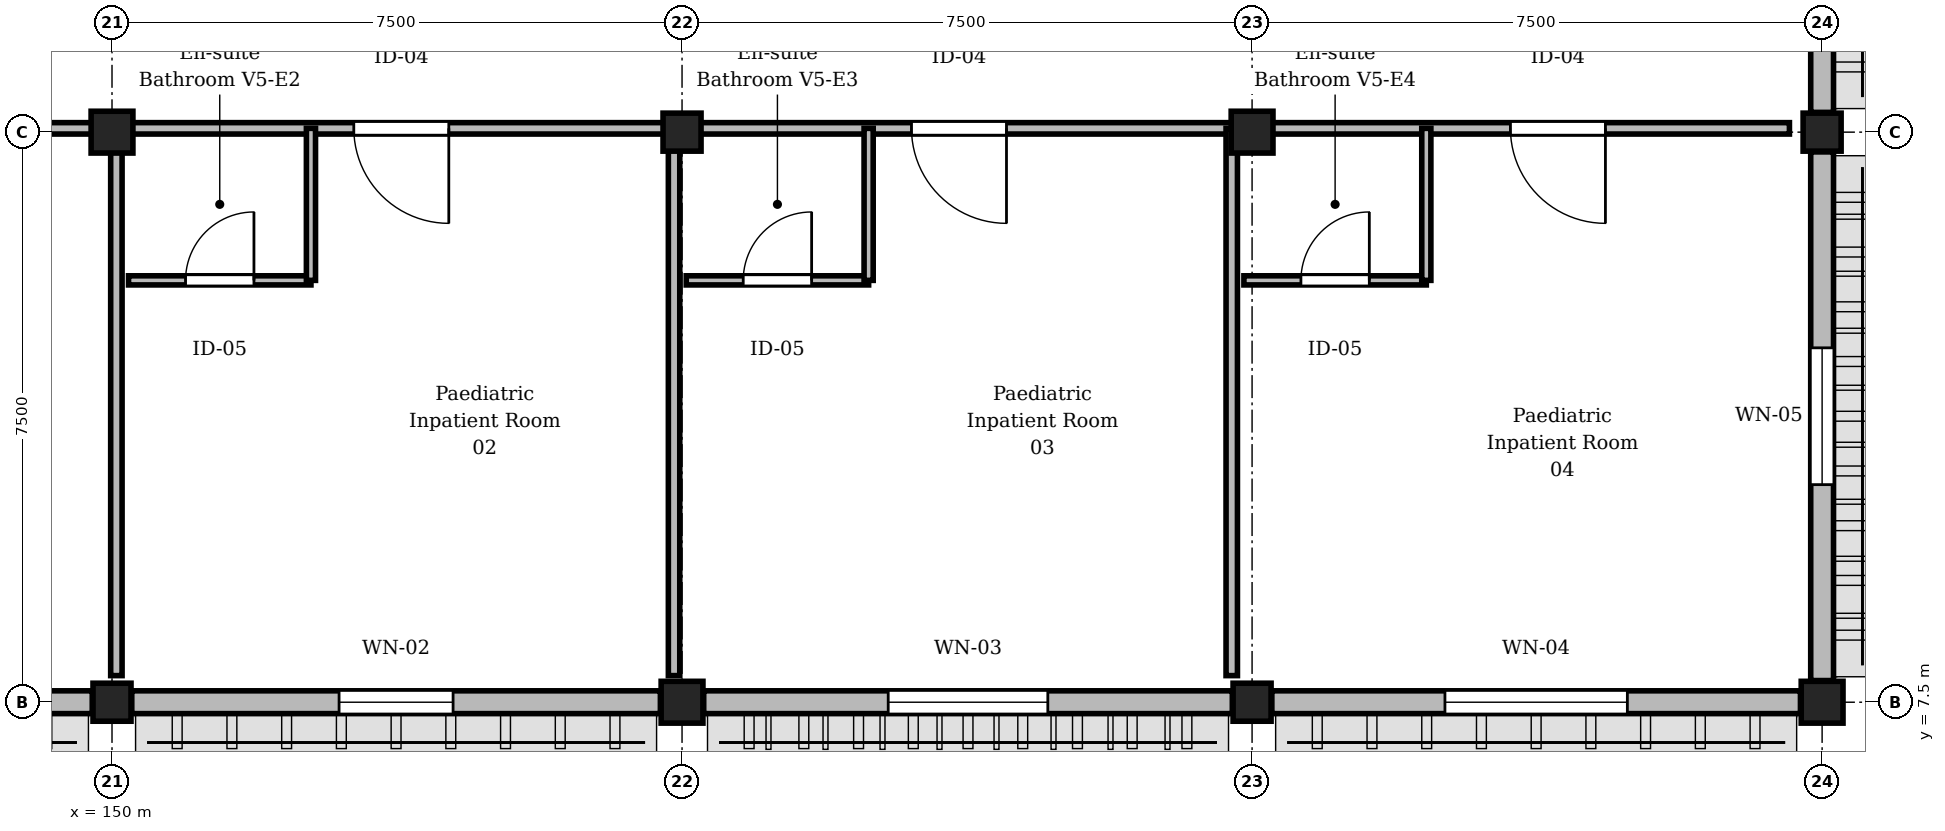
"""IFC4 building model, lengths in metres.
Left out: names, types, materials, properties, quantities, classifications, styles, units other than length and angle.
Written with IfcOpenShell. Run it as: python <this file> out.ifc"""

import sys

from ifc_helpers import new_model, si_unit, direction, frame, frame_2d, origin, origin_2d, place, context, subcontext, project, spatial, rectangle, extrude, element, fill, save


model = new_model("IFC4")
c1 = context("Model", 3, precision=1e-05, world=origin(), true_north=direction((0.0, 1.0)))
c2 = subcontext(c1, "Body", "Model", "MODEL_VIEW")
j1 = project(units=[si_unit("LENGTHUNIT", "METRE"), si_unit("PLANEANGLEUNIT", "RADIAN")], contexts=[c1])
p1 = place(None, origin())
s1 = spatial("IfcSite", under=j1, at=p1, CompositionType="ELEMENT")
p2 = place(p1, origin())
s2 = spatial("IfcBuilding", under=s1, at=p2, CompositionType="ELEMENT")
p3 = place(p2, frame((0.0, 0.0, 17.85)))
s3 = spatial("IfcBuildingStorey", under=s2, at=p3, CompositionType="ELEMENT", Elevation=17.85)
p4 = place(p3, frame((150.0, 7.5, 0.0), z_axis=(0.0, 0.0, 1.0), x_axis=(1.0, 0.0, 0.0)))
e1 = element("IfcColumn", 1, at=p4, inside=s3, PredefinedType="COLUMN", context=c2, shape_type="SweptSolid", body=[
    extrude(rectangle(XDim=0.5, YDim=0.5, at=origin_2d()), origin(), (0.0, 0.0, 1.0), 4.05),
])
for number, where, z_axis, x_axis in (
    (2, (150.0, 15.0, 0.0), (0.0, 0.0, 1.0), (1.0, 0.0, 0.0)),
    (3, (157.5, 7.5, 0.0), (0.0, 0.0, 1.0), (1.0, 0.0, 0.0)),
):
    element("IfcColumn", number, at=place(p3, frame(where, z_axis=z_axis, x_axis=x_axis)), inside=s3, PredefinedType="COLUMN", context=c2, shape_type="SweptSolid", body=[
        extrude(rectangle(XDim=0.55, YDim=0.55, at=origin_2d()), origin(), (0.0, 0.0, 1.0), 4.05),
    ])
for number, where, z_axis, x_axis in (
    (4, (157.5, 15.0, 0.0), (0.0, 0.0, 1.0), (1.0, 0.0, 0.0)),
    (5, (165.0, 7.5, 0.0), (0.0, 0.0, 1.0), (1.0, 0.0, 0.0)),
):
    element("IfcColumn", number, at=place(p3, frame(where, z_axis=z_axis, x_axis=x_axis)), inside=s3, PredefinedType="COLUMN", context=c2, shape_type="SweptSolid", body=[
        extrude(rectangle(XDim=0.5, YDim=0.5, at=origin_2d()), origin(), (0.0, 0.0, 1.0), 4.05),
    ])
for number, where, z_axis, x_axis in (
    (6, (165.0, 15.0, 0.0), (0.0, 0.0, 1.0), (1.0, 0.0, 0.0)),
    (7, (172.5, 7.5, 0.0), (0.0, 0.0, 1.0), (1.0, 0.0, 0.0)),
):
    element("IfcColumn", number, at=place(p3, frame(where, z_axis=z_axis, x_axis=x_axis)), inside=s3, PredefinedType="COLUMN", context=c2, shape_type="SweptSolid", body=[
        extrude(rectangle(XDim=0.55, YDim=0.55, at=origin_2d()), origin(), (0.0, 0.0, 1.0), 4.05),
    ])
p5 = place(p3, frame((172.5, 15.0, 0.0), z_axis=(0.0, 0.0, 1.0), x_axis=(1.0, 0.0, 0.0)))
e8 = element("IfcColumn", 8, at=p5, inside=s3, PredefinedType="COLUMN", context=c2, shape_type="SweptSolid", body=[
    extrude(rectangle(XDim=0.5, YDim=0.5, at=origin_2d()), origin(), (0.0, 0.0, 1.0), 4.05),
])
p6 = place(p3, frame((149.74, 7.5, 0.0), z_axis=(0.0, 0.0, 1.0), x_axis=(-1.0, 0.0, 0.0)))
e9 = element("IfcWall", 9, at=p6, inside=s3, PredefinedType="STANDARD", context=c2, shape_type="SweptSolid", body=[
    extrude(rectangle(XDim=6.955, YDim=0.3, at=frame_2d((3.478, 0.0))), origin(), (0.0, 0.0, 1.0), 3.17),
])
p7 = place(p6, frame((2.577, 0.0, 0.9)))
e10 = element("IfcOpeningElement", 10, at=p7, cuts=e9, PredefinedType="OPENING", context=c2, shape_type="SweptSolid", body=[
    extrude(rectangle(XDim=1.8, YDim=1.99, at=frame_2d((0.9, 0.995))), frame((0.0, 0.16, 0.0), z_axis=(0.0, -1.0, 0.0), x_axis=(1.0, 0.0, 0.0)), (0.0, 0.0, 1.0), 0.32),
])
p8 = place(p3, frame((157.215, 7.5, 0.0), z_axis=(0.0, 0.0, 1.0), x_axis=(-1.0, 0.0, 0.0)))
e11 = element("IfcWall", 11, at=p8, inside=s3, PredefinedType="STANDARD", context=c2, shape_type="SweptSolid", body=[
    extrude(rectangle(XDim=6.955, YDim=0.3, at=frame_2d((3.478, 0.0))), origin(), (0.0, 0.0, 1.0), 3.17),
])
p9 = place(p8, frame((2.728, 0.0, 0.9)))
e12 = element("IfcOpeningElement", 12, at=p9, cuts=e11, PredefinedType="OPENING", context=c2, shape_type="SweptSolid", body=[
    extrude(rectangle(XDim=1.5, YDim=1.99, at=frame_2d((0.75, 0.995))), frame((0.0, 0.16, 0.0), z_axis=(0.0, -1.0, 0.0), x_axis=(1.0, 0.0, 0.0)), (0.0, 0.0, 1.0), 0.32),
])
p10 = place(p3, frame((164.74, 7.5, 0.0), z_axis=(0.0, 0.0, 1.0), x_axis=(-1.0, 0.0, 0.0)))
e13 = element("IfcWall", 13, at=p10, inside=s3, PredefinedType="STANDARD", context=c2, shape_type="SweptSolid", body=[
    extrude(rectangle(XDim=6.955, YDim=0.3, at=frame_2d((3.478, 0.0))), origin(), (0.0, 0.0, 1.0), 3.17),
])
p11 = place(p10, frame((2.427, 0.0, 0.9)))
e14 = element("IfcOpeningElement", 14, at=p11, cuts=e13, PredefinedType="OPENING", context=c2, shape_type="SweptSolid", body=[
    extrude(rectangle(XDim=2.1, YDim=1.99, at=frame_2d((1.05, 0.995))), frame((0.0, 0.16, 0.0), z_axis=(0.0, -1.0, 0.0), x_axis=(1.0, 0.0, 0.0)), (0.0, 0.0, 1.0), 0.32),
])
p12 = place(p3, frame((172.215, 7.5, 0.0), z_axis=(0.0, 0.0, 1.0), x_axis=(-1.0, 0.0, 0.0)))
e15 = element("IfcWall", 15, at=p12, inside=s3, PredefinedType="STANDARD", context=c2, shape_type="SweptSolid", body=[
    extrude(rectangle(XDim=6.955, YDim=0.3, at=frame_2d((3.478, 0.0))), origin(), (0.0, 0.0, 1.0), 3.17),
])
p13 = place(p12, frame((2.278, 0.0, 0.9)))
e16 = element("IfcOpeningElement", 16, at=p13, cuts=e15, PredefinedType="OPENING", context=c2, shape_type="SweptSolid", body=[
    extrude(rectangle(XDim=2.4, YDim=1.99, at=frame_2d((1.2, 0.995))), frame((0.0, 0.16, 0.0), z_axis=(0.0, -1.0, 0.0), x_axis=(1.0, 0.0, 0.0)), (0.0, 0.0, 1.0), 0.32),
])
p14 = place(p3, frame((172.5, 14.74, 0.0), z_axis=(0.0, 0.0, 1.0), x_axis=(0.0, -1.0, 0.0)))
e17 = element("IfcWall", 17, at=p14, inside=s3, PredefinedType="STANDARD", context=c2, shape_type="SweptSolid", body=[
    extrude(rectangle(XDim=6.955, YDim=0.3, at=frame_2d((3.478, 0.0))), origin(), (0.0, 0.0, 1.0), 3.17),
])
p15 = place(p14, frame((2.577, 0.0, 0.9)))
e18 = element("IfcOpeningElement", 18, at=p15, cuts=e17, PredefinedType="OPENING", context=c2, shape_type="SweptSolid", body=[
    extrude(rectangle(XDim=1.8, YDim=1.99, at=frame_2d((0.9, 0.995))), frame((0.0, 0.16, 0.0), z_axis=(0.0, -1.0, 0.0), x_axis=(1.0, 0.0, 0.0)), (0.0, 0.0, 1.0), 0.32),
])
p16 = place(p3, frame((172.5, 22.215, 0.0), z_axis=(0.0, 0.0, 1.0), x_axis=(0.0, -1.0, 0.0)))
e19 = element("IfcWall", 19, at=p16, inside=s3, PredefinedType="STANDARD", context=c2, shape_type="SweptSolid", body=[
    extrude(rectangle(XDim=6.955, YDim=0.3, at=frame_2d((3.478, 0.0))), origin(), (0.0, 0.0, 1.0), 3.17),
])
p17 = place(p16, frame((2.728, 0.0, 0.9)))
e20 = element("IfcOpeningElement", 20, at=p17, cuts=e19, PredefinedType="OPENING", context=c2, shape_type="SweptSolid", body=[
    extrude(rectangle(XDim=1.5, YDim=1.99, at=frame_2d((0.75, 0.995))), frame((0.0, 0.16, 0.0), z_axis=(0.0, -1.0, 0.0), x_axis=(1.0, 0.0, 0.0)), (0.0, 0.0, 1.0), 0.32),
])
p18 = place(p3, frame((150.058, 15.05, 0.0), z_axis=(0.0, 0.0, 1.0), x_axis=(-1.0, 0.0, 0.0)))
e21 = element("IfcWall", 21, at=p18, inside=s3, PredefinedType="PARTITIONING", context=c2, shape_type="SweptSolid", body=[
    extrude(rectangle(XDim=7.178, YDim=0.15, at=frame_2d((3.589, 0.0))), origin(), (0.0, 0.0, 1.0), 3.205),
])
p19 = place(p18, frame((2.964, 0.0, 0.0)))
e22 = element("IfcOpeningElement", 22, at=p19, cuts=e21, PredefinedType="OPENING", context=c2, shape_type="SweptSolid", body=[
    extrude(rectangle(XDim=1.25, YDim=2.2, at=frame_2d((0.625, 1.1))), frame((0.0, 0.085, 0.0), z_axis=(0.0, -1.0, 0.0), x_axis=(1.0, 0.0, 0.0)), (0.0, 0.0, 1.0), 0.17),
])
p20 = place(p3, frame((157.395, 15.05, 0.0), z_axis=(0.0, 0.0, 1.0), x_axis=(-1.0, 0.0, 0.0)))
e23 = element("IfcWall", 23, at=p20, inside=s3, PredefinedType="PARTITIONING", context=c2, shape_type="SweptSolid", body=[
    extrude(rectangle(XDim=7.177, YDim=0.15, at=frame_2d((3.589, 0.0))), origin(), (0.0, 0.0, 1.0), 3.155),
])
p21 = place(p20, frame((2.964, 0.0, 0.0)))
e24 = element("IfcOpeningElement", 24, at=p21, cuts=e23, PredefinedType="OPENING", context=c2, shape_type="SweptSolid", body=[
    extrude(rectangle(XDim=1.25, YDim=2.2, at=frame_2d((0.625, 1.1))), frame((0.0, 0.085, 0.0), z_axis=(0.0, -1.0, 0.0), x_axis=(1.0, 0.0, 0.0)), (0.0, 0.0, 1.0), 0.17),
])
p22 = place(p3, frame((150.218, 13.05, 0.0), z_axis=(0.0, 0.0, 1.0), x_axis=(1.0, 0.0, 0.0)))
e25 = element("IfcWall", 25, at=p22, inside=s3, PredefinedType="PARTITIONING", context=c2, shape_type="SweptSolid", body=[
    extrude(rectangle(XDim=2.4, YDim=0.12, at=frame_2d((1.2, 0.0))), origin(), (0.0, 0.0, 1.0), 3.755),
])
p23 = place(p22, frame((0.75, 0.0, 0.0)))
e26 = element("IfcOpeningElement", 26, at=p23, cuts=e25, PredefinedType="OPENING", context=c2, shape_type="SweptSolid", body=[
    extrude(rectangle(XDim=0.9, YDim=2.1, at=frame_2d((0.45, 1.05))), frame((0.0, 0.07, 0.0), z_axis=(0.0, -1.0, 0.0), x_axis=(1.0, 0.0, 0.0)), (0.0, 0.0, 1.0), 0.14),
])
p24 = place(p3, frame((152.617, 13.05, 0.0), z_axis=(0.0, 0.0, 1.0), x_axis=(0.0, 1.0, 0.0)))
e27 = element("IfcWall", 27, at=p24, inside=s3, PredefinedType="PARTITIONING", context=c2, shape_type="SweptSolid", body=[
    extrude(rectangle(XDim=2.0, YDim=0.12, at=frame_2d((1.0, 0.0))), origin(), (0.0, 0.0, 1.0), 3.755),
])
p25 = place(p3, frame((164.732, 15.05, 0.0), z_axis=(0.0, 0.0, 1.0), x_axis=(-1.0, 0.0, 0.0)))
e28 = element("IfcWall", 28, at=p25, inside=s3, PredefinedType="PARTITIONING", context=c2, shape_type="SweptSolid", body=[
    extrude(rectangle(XDim=7.177, YDim=0.15, at=frame_2d((3.589, 0.0))), origin(), (0.0, 0.0, 1.0), 3.205),
])
p26 = place(p25, frame((2.964, 0.0, 0.0)))
e29 = element("IfcOpeningElement", 29, at=p26, cuts=e28, PredefinedType="OPENING", context=c2, shape_type="SweptSolid", body=[
    extrude(rectangle(XDim=1.25, YDim=2.2, at=frame_2d((0.625, 1.1))), frame((0.0, 0.085, 0.0), z_axis=(0.0, -1.0, 0.0), x_axis=(1.0, 0.0, 0.0)), (0.0, 0.0, 1.0), 0.17),
])
p27 = place(p3, frame((157.555, 13.05, 0.0), z_axis=(0.0, 0.0, 1.0), x_axis=(1.0, 0.0, 0.0)))
e30 = element("IfcWall", 30, at=p27, inside=s3, PredefinedType="PARTITIONING", context=c2, shape_type="SweptSolid", body=[
    extrude(rectangle(XDim=2.4, YDim=0.12, at=frame_2d((1.2, 0.0))), origin(), (0.0, 0.0, 1.0), 3.755),
])
p28 = place(p27, frame((0.75, 0.0, 0.0)))
e31 = element("IfcOpeningElement", 31, at=p28, cuts=e30, PredefinedType="OPENING", context=c2, shape_type="SweptSolid", body=[
    extrude(rectangle(XDim=0.9, YDim=2.1, at=frame_2d((0.45, 1.05))), frame((0.0, 0.07, 0.0), z_axis=(0.0, -1.0, 0.0), x_axis=(1.0, 0.0, 0.0)), (0.0, 0.0, 1.0), 0.14),
])
p29 = place(p3, frame((159.955, 13.05, 0.0), z_axis=(0.0, 0.0, 1.0), x_axis=(0.0, 1.0, 0.0)))
e32 = element("IfcWall", 32, at=p29, inside=s3, PredefinedType="PARTITIONING", context=c2, shape_type="SweptSolid", body=[
    extrude(rectangle(XDim=2.0, YDim=0.12, at=frame_2d((1.0, 0.0))), origin(), (0.0, 0.0, 1.0), 3.755),
])
p30 = place(p3, frame((172.07, 15.05, 0.0), z_axis=(0.0, 0.0, 1.0), x_axis=(-1.0, 0.0, 0.0)))
e33 = element("IfcWall", 33, at=p30, inside=s3, PredefinedType="PARTITIONING", context=c2, shape_type="SweptSolid", body=[
    extrude(rectangle(XDim=7.177, YDim=0.15, at=frame_2d((3.589, 0.0))), origin(), (0.0, 0.0, 1.0), 3.155),
])
p31 = place(p30, frame((2.421, 0.0, 0.0)))
e34 = element("IfcOpeningElement", 34, at=p31, cuts=e33, PredefinedType="OPENING", context=c2, shape_type="SweptSolid", body=[
    extrude(rectangle(XDim=1.25, YDim=2.2, at=frame_2d((0.625, 1.1))), frame((0.0, 0.085, 0.0), z_axis=(0.0, -1.0, 0.0), x_axis=(1.0, 0.0, 0.0)), (0.0, 0.0, 1.0), 0.17),
])
p32 = place(p3, frame((164.893, 13.05, 0.0), z_axis=(0.0, 0.0, 1.0), x_axis=(1.0, 0.0, 0.0)))
e35 = element("IfcWall", 35, at=p32, inside=s3, PredefinedType="PARTITIONING", context=c2, shape_type="SweptSolid", body=[
    extrude(rectangle(XDim=2.4, YDim=0.12, at=frame_2d((1.2, 0.0))), origin(), (0.0, 0.0, 1.0), 3.755),
])
p33 = place(p32, frame((0.75, 0.0, 0.0)))
e36 = element("IfcOpeningElement", 36, at=p33, cuts=e35, PredefinedType="OPENING", context=c2, shape_type="SweptSolid", body=[
    extrude(rectangle(XDim=0.9, YDim=2.1, at=frame_2d((0.45, 1.05))), frame((0.0, 0.07, 0.0), z_axis=(0.0, -1.0, 0.0), x_axis=(1.0, 0.0, 0.0)), (0.0, 0.0, 1.0), 0.14),
])
p34 = place(p3, frame((167.292, 13.05, 0.0), z_axis=(0.0, 0.0, 1.0), x_axis=(0.0, 1.0, 0.0)))
e37 = element("IfcWall", 37, at=p34, inside=s3, PredefinedType="PARTITIONING", context=c2, shape_type="SweptSolid", body=[
    extrude(rectangle(XDim=2.0, YDim=0.12, at=frame_2d((1.0, 0.0))), origin(), (0.0, 0.0, 1.0), 3.755),
])
p35 = place(p3, frame((150.058, 7.85, 0.0), z_axis=(0.0, 0.0, 1.0), x_axis=(0.0, 1.0, 0.0)))
e38 = element("IfcWall", 38, at=p35, inside=s3, PredefinedType="PARTITIONING", context=c2, shape_type="SweptSolid", body=[
    extrude(rectangle(XDim=7.2, YDim=0.15, at=frame_2d((3.6, 0.0))), origin(), (0.0, 0.0, 1.0), 3.255),
])
p36 = place(p3, frame((157.395, 7.85, 0.0), z_axis=(0.0, 0.0, 1.0), x_axis=(0.0, 1.0, 0.0)))
e39 = element("IfcWall", 39, at=p36, inside=s3, PredefinedType="PARTITIONING", context=c2, shape_type="SweptSolid", body=[
    extrude(rectangle(XDim=7.2, YDim=0.15, at=frame_2d((3.6, 0.0))), origin(), (0.0, 0.0, 1.0), 3.205),
])
p37 = place(p3, frame((164.732, 7.85, 0.0), z_axis=(0.0, 0.0, 1.0), x_axis=(0.0, 1.0, 0.0)))
e40 = element("IfcWall", 40, at=p37, inside=s3, PredefinedType="PARTITIONING", context=c2, shape_type="SweptSolid", body=[
    extrude(rectangle(XDim=7.2, YDim=0.15, at=frame_2d((3.6, 0.0))), origin(), (0.0, 0.0, 1.0), 3.255),
])
p38 = place(p9, origin())
e41 = element("IfcWindow", 41, at=p38, inside=s3, PartitioningType="SINGLE_PANEL", PredefinedType="WINDOW", context=c2, shape_type="SweptSolid", body=[
    extrude(rectangle(XDim=1.5, YDim=1.99, at=frame_2d((0.75, 0.995))), frame((0.0, 0.03, 0.0), z_axis=(0.0, -1.0, 0.0), x_axis=(1.0, 0.0, 0.0)), (0.0, 0.0, 1.0), 0.06),
])
fill(e12, e41)
p39 = place(p11, origin())
e42 = element("IfcWindow", 42, at=p39, inside=s3, PartitioningType="SINGLE_PANEL", PredefinedType="WINDOW", context=c2, shape_type="SweptSolid", body=[
    extrude(rectangle(XDim=2.1, YDim=1.99, at=frame_2d((1.05, 0.995))), frame((0.0, 0.03, 0.0), z_axis=(0.0, -1.0, 0.0), x_axis=(1.0, 0.0, 0.0)), (0.0, 0.0, 1.0), 0.06),
])
fill(e14, e42)
p40 = place(p13, origin())
e43 = element("IfcWindow", 43, at=p40, inside=s3, PartitioningType="SINGLE_PANEL", PredefinedType="WINDOW", context=c2, shape_type="SweptSolid", body=[
    extrude(rectangle(XDim=2.4, YDim=1.99, at=frame_2d((1.2, 0.995))), frame((0.0, 0.03, 0.0), z_axis=(0.0, -1.0, 0.0), x_axis=(1.0, 0.0, 0.0)), (0.0, 0.0, 1.0), 0.06),
])
fill(e16, e43)
p41 = place(p15, origin())
e44 = element("IfcWindow", 44, at=p41, inside=s3, PartitioningType="SINGLE_PANEL", PredefinedType="WINDOW", context=c2, shape_type="SweptSolid", body=[
    extrude(rectangle(XDim=1.8, YDim=1.99, at=frame_2d((0.9, 0.995))), frame((0.0, 0.03, 0.0), z_axis=(0.0, -1.0, 0.0), x_axis=(1.0, 0.0, 0.0)), (0.0, 0.0, 1.0), 0.06),
])
fill(e18, e44)
p42 = place(p21, origin())
e45 = element("IfcDoor", 45, at=p42, inside=s3, OperationType="SINGLE_SWING_LEFT", PredefinedType="DOOR", context=c2, shape_type="SweptSolid", body=[
    extrude(rectangle(XDim=1.25, YDim=2.2, at=frame_2d((0.625, 1.1))), frame((0.0, 0.025, 0.0), z_axis=(0.0, -1.0, 0.0), x_axis=(1.0, 0.0, 0.0)), (0.0, 0.0, 1.0), 0.05),
])
fill(e24, e45)
p43 = place(p23, origin())
e46 = element("IfcDoor", 46, at=p43, inside=s3, OperationType="SINGLE_SWING_RIGHT", PredefinedType="DOOR", context=c2, shape_type="SweptSolid", body=[
    extrude(rectangle(XDim=0.9, YDim=2.1, at=frame_2d((0.45, 1.05))), frame((0.0, 0.025, 0.0), z_axis=(0.0, -1.0, 0.0), x_axis=(1.0, 0.0, 0.0)), (0.0, 0.0, 1.0), 0.05),
])
fill(e26, e46)
p44 = place(p26, origin())
e47 = element("IfcDoor", 47, at=p44, inside=s3, OperationType="SINGLE_SWING_LEFT", PredefinedType="DOOR", context=c2, shape_type="SweptSolid", body=[
    extrude(rectangle(XDim=1.25, YDim=2.2, at=frame_2d((0.625, 1.1))), frame((0.0, 0.025, 0.0), z_axis=(0.0, -1.0, 0.0), x_axis=(1.0, 0.0, 0.0)), (0.0, 0.0, 1.0), 0.05),
])
fill(e29, e47)
p45 = place(p28, origin())
e48 = element("IfcDoor", 48, at=p45, inside=s3, OperationType="SINGLE_SWING_RIGHT", PredefinedType="DOOR", context=c2, shape_type="SweptSolid", body=[
    extrude(rectangle(XDim=0.9, YDim=2.1, at=frame_2d((0.45, 1.05))), frame((0.0, 0.025, 0.0), z_axis=(0.0, -1.0, 0.0), x_axis=(1.0, 0.0, 0.0)), (0.0, 0.0, 1.0), 0.05),
])
fill(e31, e48)
p46 = place(p31, origin())
e49 = element("IfcDoor", 49, at=p46, inside=s3, OperationType="SINGLE_SWING_LEFT", PredefinedType="DOOR", context=c2, shape_type="SweptSolid", body=[
    extrude(rectangle(XDim=1.25, YDim=2.2, at=frame_2d((0.625, 1.1))), frame((0.0, 0.025, 0.0), z_axis=(0.0, -1.0, 0.0), x_axis=(1.0, 0.0, 0.0)), (0.0, 0.0, 1.0), 0.05),
])
fill(e34, e49)
p47 = place(p33, origin())
e50 = element("IfcDoor", 50, at=p47, inside=s3, OperationType="SINGLE_SWING_RIGHT", PredefinedType="DOOR", context=c2, shape_type="SweptSolid", body=[
    extrude(rectangle(XDim=0.9, YDim=2.1, at=frame_2d((0.45, 1.05))), frame((0.0, 0.025, 0.0), z_axis=(0.0, -1.0, 0.0), x_axis=(1.0, 0.0, 0.0)), (0.0, 0.0, 1.0), 0.05),
])
fill(e36, e50)
save(model, sys.argv[1])
